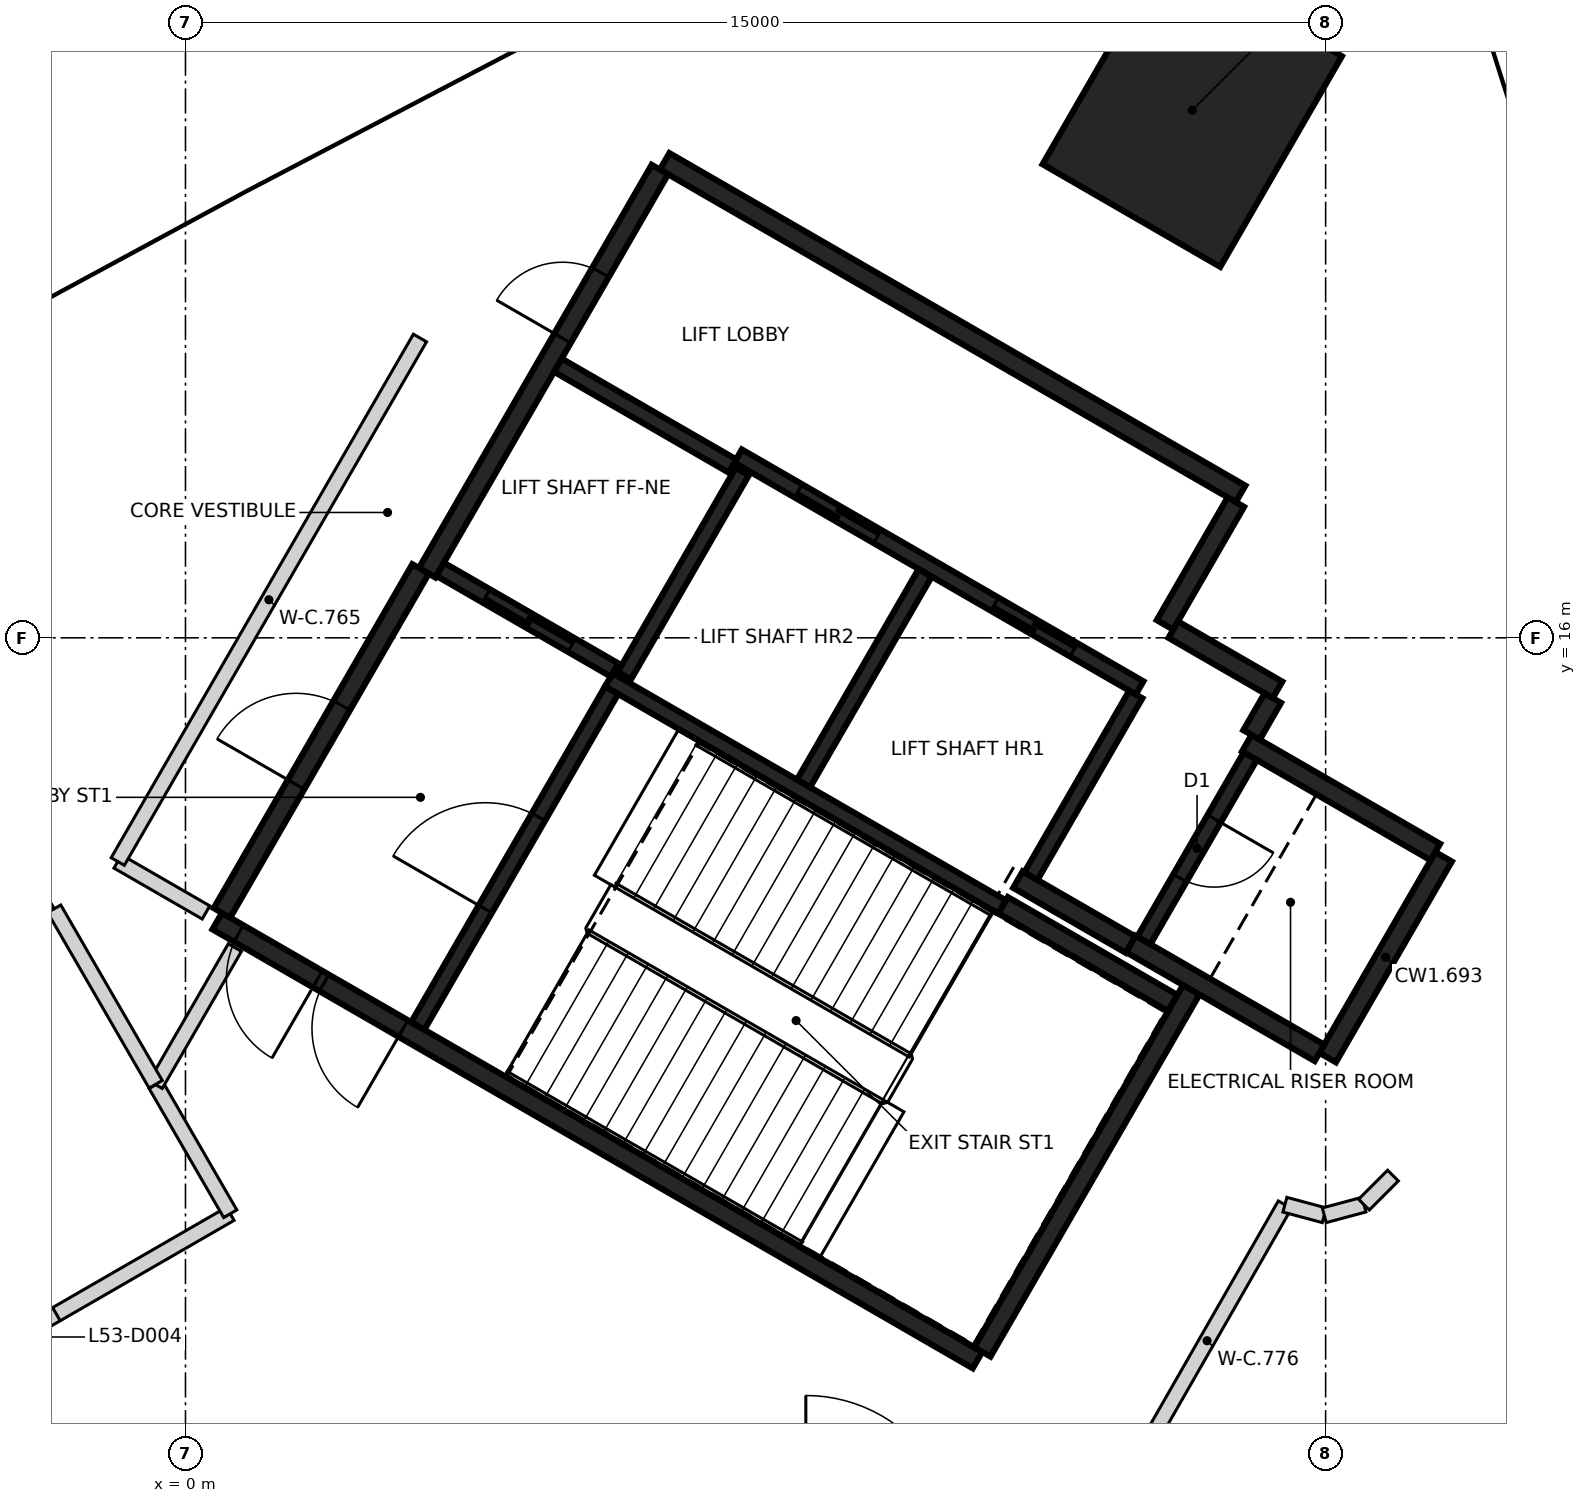
"""IFC4 building model, lengths in metres.
Left out: names, types, materials, properties, quantities, classifications, styles, units other than length and angle.
Written with IfcOpenShell. Run it as: python <this file> out.ifc"""

import sys

from ifc_helpers import new_model, si_unit, direction, frame, frame_2d, origin, origin_2d, place, context, subcontext, project, spatial, rectangle, extrude, element, fill, save


model = new_model("IFC4")
c1 = context("Model", 3, precision=1e-05, world=origin(), true_north=direction((0.0, 1.0)))
c2 = subcontext(c1, "Body", "Model", "MODEL_VIEW")
j1 = project(units=[si_unit("LENGTHUNIT", "METRE"), si_unit("PLANEANGLEUNIT", "RADIAN")], contexts=[c1])
p1 = place(None, origin())
s1 = spatial("IfcSite", under=j1, at=p1, CompositionType="ELEMENT")
p2 = place(p1, origin())
s2 = spatial("IfcBuilding", under=s1, at=p2, CompositionType="ELEMENT")
p3 = place(p2, frame((0.0, 0.0, 211.6)))
s3 = spatial("IfcBuildingStorey", under=s2, at=p3, CompositionType="ELEMENT", Elevation=211.6)
p4 = place(p3, frame((13.245, 22.941, -0.4), z_axis=(0.0, 0.0, 1.0), x_axis=(0.5, 0.866025403784, 0.0)))
e1 = element("IfcColumn", 1, at=p4, inside=s3, PredefinedType="COLUMN", context=c2, shape_type="SweptSolid", body=[
    extrude(rectangle(XDim=3.2, YDim=2.7, at=origin_2d()), origin(), (0.0, 0.0, 1.0), 4.85),
])
p5 = place(p3, frame((10.42, 6.498, 0.0), z_axis=(0.0, 0.0, 1.0), x_axis=(-0.866021906294, 0.500006057782, 0.0)))
e2 = element("IfcWall", 2, at=p5, inside=s3, PredefinedType="SHEAR", context=c2, shape_type="SweptSolid", body=[
    extrude(rectangle(XDim=11.55, YDim=0.25, at=frame_2d((5.775, 0.0))), origin(), (0.0, 0.0, 1.0), 4.45),
])
p6 = place(p5, frame((10.025, 0.0, 0.0)))
e3 = element("IfcOpeningElement", 3, at=p6, cuts=e2, PredefinedType="OPENING", context=c2, shape_type="SweptSolid", body=[
    extrude(rectangle(XDim=1.2, YDim=2.1, at=frame_2d((0.6, 1.05))), frame((0.0, 0.135, 0.0), z_axis=(0.0, -1.0, 0.0), x_axis=(1.0, 0.0, 0.0)), (0.0, 0.0, 1.0), 0.27),
])
p7 = place(p5, frame((8.725, 0.0, 0.0)))
e4 = element("IfcOpeningElement", 4, at=p7, cuts=e2, PredefinedType="OPENING", context=c2, shape_type="SweptSolid", body=[
    extrude(rectangle(XDim=1.2, YDim=2.1, at=frame_2d((0.6, 1.05))), frame((0.0, 0.135, 0.0), z_axis=(0.0, -1.0, 0.0), x_axis=(1.0, 0.0, 0.0)), (0.0, 0.0, 1.0), 0.27),
])
p8 = place(p3, frame((6.304, 22.269, 0.0), z_axis=(0.0, 0.0, 1.0), x_axis=(0.866022959057, -0.500004234368, 0.0)))
e5 = element("IfcWall", 5, at=p8, inside=s3, PredefinedType="SHEAR", context=c2, shape_type="SweptSolid", body=[
    extrude(rectangle(XDim=8.75, YDim=0.25, at=frame_2d((4.375, 0.0))), origin(), (0.0, 0.0, 1.0), 4.45),
])
p9 = place(p3, frame((3.179, 16.856, 0.0), z_axis=(0.0, 0.0, 1.0), x_axis=(0.500001955336, 0.866024274868, 0.0)))
e6 = element("IfcWall", 6, at=p9, inside=s3, PredefinedType="SHEAR", context=c2, shape_type="SweptSolid", body=[
    extrude(rectangle(XDim=6.125, YDim=0.25, at=frame_2d((3.062, 0.0))), origin(), (0.0, 0.0, 1.0), 4.45),
])
p10 = place(p9, frame((3.563, 0.0, 0.0)))
e7 = element("IfcOpeningElement", 7, at=p10, cuts=e6, PredefinedType="OPENING", context=c2, shape_type="SweptSolid", body=[
    extrude(rectangle(XDim=1.0, YDim=2.1, at=frame_2d((0.5, 1.05))), frame((0.0, 0.135, 0.0), z_axis=(0.0, -1.0, 0.0), x_axis=(1.0, 0.0, 0.0)), (0.0, 0.0, 1.0), 0.27),
])
p11 = place(p3, frame((0.48, 12.381, 0.0), z_axis=(0.0, 0.0, 1.0), x_axis=(0.49999885962, 0.866026062182, 0.0)))
e8 = element("IfcWall", 8, at=p11, inside=s3, PredefinedType="SHEAR", context=c2, shape_type="SweptSolid", body=[
    extrude(rectangle(XDim=5.225, YDim=0.25, at=frame_2d((2.612, 0.0))), origin(), (0.0, 0.0, 1.0), 4.45),
])
p12 = place(p11, frame((1.95, 0.0, 0.0)))
e9 = element("IfcOpeningElement", 9, at=p12, cuts=e8, PredefinedType="OPENING", context=c2, shape_type="SweptSolid", body=[
    extrude(rectangle(XDim=1.2, YDim=2.1, at=frame_2d((0.6, 1.05))), frame((0.0, 0.135, 0.0), z_axis=(0.0, -1.0, 0.0), x_axis=(1.0, 0.0, 0.0)), (0.0, 0.0, 1.0), 0.27),
])
p13 = place(p3, frame((13.238, 11.378, 0.0), z_axis=(0.0, 0.0, 1.0), x_axis=(-0.500008851346, -0.866020293397, 0.0)))
e10 = element("IfcWall", 10, at=p13, inside=s3, PredefinedType="SHEAR", context=c2, shape_type="SweptSolid", body=[
    extrude(rectangle(XDim=5.51, YDim=0.25, at=frame_2d((2.755, 0.0))), origin(), (0.0, 0.0, 1.0), 4.45),
])
p14 = place(p3, frame((16.552, 13.119, 0.0), z_axis=(0.0, 0.0, 1.0), x_axis=(-0.499978833458, -0.866037623948, 0.0)))
e11 = element("IfcWall", 11, at=p14, inside=s3, PredefinedType="SHEAR", context=c2, shape_type="SweptSolid", body=[
    extrude(rectangle(XDim=3.05, YDim=0.25, at=frame_2d((1.525, 0.0))), origin(), (0.0, 0.0, 1.0), 4.45),
])
p15 = place(p3, frame((14.918, 10.54, 0.0), z_axis=(0.0, 0.0, 1.0), x_axis=(-0.866063538972, 0.499933942099, 0.0)))
e12 = element("IfcWall", 12, at=p15, inside=s3, PredefinedType="SHEAR", context=c2, shape_type="SweptSolid", body=[
    extrude(rectangle(XDim=2.865, YDim=0.25, at=frame_2d((1.432, 0.0))), origin(), (0.0, 0.0, 1.0), 4.45),
])
p16 = place(p3, frame((13.963, 14.614, 0.0), z_axis=(0.0, 0.0, 1.0), x_axis=(0.866042235819, -0.499970844928, 0.0)))
e13 = element("IfcWall", 13, at=p16, inside=s3, PredefinedType="SHEAR", context=c2, shape_type="SweptSolid", body=[
    extrude(rectangle(XDim=2.865, YDim=0.25, at=frame_2d((1.432, 0.0))), origin(), (0.0, 0.0, 1.0), 4.45),
])
p17 = place(p3, frame((10.757, 12.481, 0.0), z_axis=(0.0, 0.0, 1.0), x_axis=(0.866022940537, -0.500004266446, 0.0)))
e14 = element("IfcWall", 14, at=p17, inside=s3, PredefinedType="SHEAR", context=c2, shape_type="SweptSolid", body=[
    extrude(rectangle(XDim=2.575, YDim=0.25, at=frame_2d((1.287, 0.0))), origin(), (0.0, 0.0, 1.0), 4.45),
])
p18 = place(p3, frame((13.819, 17.785, 0.0), z_axis=(0.0, 0.0, 1.0), x_axis=(-0.500039802285, -0.866002422705, 0.0)))
e15 = element("IfcWall", 15, at=p18, inside=s3, PredefinedType="SHEAR", context=c2, shape_type="SweptSolid", body=[
    extrude(rectangle(XDim=1.865, YDim=0.25, at=frame_2d((0.932, 0.0))), origin(), (0.0, 0.0, 1.0), 4.45),
])
p19 = place(p3, frame((12.433, 11.964, 0.0), z_axis=(0.0, 0.0, 1.0), x_axis=(-0.866038183914, 0.499977863513, 0.0)))
e16 = element("IfcWall", 16, at=p19, inside=s3, PredefinedType="SHEAR", context=c2, shape_type="SweptSolid", body=[
    extrude(rectangle(XDim=1.71, YDim=0.25, at=frame_2d((0.855, 0.0))), origin(), (0.0, 0.0, 1.0), 4.45),
])
p20 = place(p3, frame((12.995, 16.108, 0.0), z_axis=(0.0, 0.0, 1.0), x_axis=(0.866044474677, -0.49996696679, 0.0)))
e17 = element("IfcWall", 17, at=p20, inside=s3, PredefinedType="SHEAR", context=c2, shape_type="SweptSolid", body=[
    extrude(rectangle(XDim=1.584, YDim=0.25, at=frame_2d((0.792, 0.0))), origin(), (0.0, 0.0, 1.0), 4.45),
])
p21 = place(p3, frame((14.305, 15.207, 0.0), z_axis=(0.0, 0.0, 1.0), x_axis=(-0.499848422343, -0.866112899501, 0.0)))
e18 = element("IfcWall", 18, at=p21, inside=s3, PredefinedType="SHEAR", context=c2, shape_type="SweptSolid", body=[
    extrude(rectangle(XDim=0.559, YDim=0.25, at=frame_2d((0.28, 0.0))), origin(), (0.0, 0.0, 1.0), 4.45),
])
p22 = place(p3, frame((12.552, 15.342, 0.0), z_axis=(0.0, 0.0, 1.0), x_axis=(-0.866030299012, 0.499991521122, 0.0)))
e19 = element("IfcWall", 19, at=p22, inside=s3, PredefinedType="SHEAR", context=c2, shape_type="SweptSolid", body=[
    extrude(rectangle(XDim=6.1, YDim=0.2, at=frame_2d((3.05, 0.0))), origin(), (0.0, 0.0, 1.0), 4.45),
])
p23 = place(p22, frame((1.0, 0.0, 0.0)))
e20 = element("IfcOpeningElement", 20, at=p23, cuts=e19, PredefinedType="OPENING", context=c2, shape_type="SweptSolid", body=[
    extrude(rectangle(XDim=1.2, YDim=2.1, at=frame_2d((0.6, 1.05))), frame((0.0, 0.11, 0.0), z_axis=(0.0, -1.0, 0.0), x_axis=(1.0, 0.0, 0.0)), (0.0, 0.0, 1.0), 0.22),
])
p24 = place(p22, frame((3.982, 0.0, 0.0)))
e21 = element("IfcOpeningElement", 21, at=p24, cuts=e19, PredefinedType="OPENING", context=c2, shape_type="SweptSolid", body=[
    extrude(rectangle(XDim=1.2, YDim=2.1, at=frame_2d((0.6, 1.05))), frame((0.0, 0.11, 0.0), z_axis=(0.0, -1.0, 0.0), x_axis=(1.0, 0.0, 0.0)), (0.0, 0.0, 1.0), 0.22),
])
p25 = place(p3, frame((10.743, 12.46, 0.0), z_axis=(0.0, 0.0, 1.0), x_axis=(-0.866018848283, 0.500011354289, 0.0)))
e22 = element("IfcWall", 22, at=p25, inside=s3, PredefinedType="SHEAR", context=c2, shape_type="SweptSolid", body=[
    extrude(rectangle(XDim=5.974, YDim=0.2, at=frame_2d((2.987, 0.0))), origin(), (0.0, 0.0, 1.0), 4.45),
])
p26 = place(p3, frame((3.057, 10.895, 0.0), z_axis=(0.0, 0.0, 1.0), x_axis=(0.500027839223, 0.866009330205, 0.0)))
e23 = element("IfcWall", 23, at=p26, inside=s3, PredefinedType="SHEAR", context=c2, shape_type="SweptSolid", body=[
    extrude(rectangle(XDim=5.098, YDim=0.2, at=frame_2d((2.549, 0.0))), origin(), (0.0, 0.0, 1.0), 4.45),
])
p27 = place(p26, frame((1.774, 0.0, 0.0)))
e24 = element("IfcOpeningElement", 24, at=p27, cuts=e23, PredefinedType="OPENING", context=c2, shape_type="SweptSolid", body=[
    extrude(rectangle(XDim=1.4, YDim=2.1, at=frame_2d((0.7, 1.05))), frame((0.0, 0.11, 0.0), z_axis=(0.0, -1.0, 0.0), x_axis=(1.0, 0.0, 0.0)), (0.0, 0.0, 1.0), 0.22),
])
p28 = place(p3, frame((8.132, 14.084, 0.0), z_axis=(0.0, 0.0, 1.0), x_axis=(0.500030834389, 0.86600760081, 0.0)))
e25 = element("IfcWall", 25, at=p28, inside=s3, PredefinedType="SHEAR", context=c2, shape_type="SweptSolid", body=[
    extrude(rectangle(XDim=3.198, YDim=0.2, at=frame_2d((1.599, 0.0))), origin(), (0.0, 0.0, 1.0), 4.45),
])
p29 = place(p3, frame((14.008, 14.442, 0.0), z_axis=(0.0, 0.0, 1.0), x_axis=(-0.499986818241, -0.866033014143, 0.0)))
e26 = element("IfcWall", 26, at=p29, inside=s3, PredefinedType="SHEAR", context=c2, shape_type="SweptSolid", body=[
    extrude(rectangle(XDim=2.798, YDim=0.2, at=frame_2d((1.399, 0.0))), origin(), (0.0, 0.0, 1.0), 4.45),
])
p30 = place(p29, frame((0.949, 0.0, 0.0)))
e27 = element("IfcOpeningElement", 27, at=p30, cuts=e26, PredefinedType="OPENING", context=c2, shape_type="SweptSolid", body=[
    extrude(rectangle(XDim=0.9, YDim=2.1, at=frame_2d((0.45, 1.05))), frame((0.0, 0.11, 0.0), z_axis=(0.0, -1.0, 0.0), x_axis=(1.0, 0.0, 0.0)), (0.0, 0.0, 1.0), 0.22),
])
p31 = place(p3, frame((12.502, 15.255, 0.0), z_axis=(0.0, 0.0, 1.0), x_axis=(-0.499965018551, -0.866045599391, 0.0)))
e28 = element("IfcWall", 28, at=p31, inside=s3, PredefinedType="SHEAR", context=c2, shape_type="SweptSolid", body=[
    extrude(rectangle(XDim=2.759, YDim=0.2, at=frame_2d((1.379, 0.0))), origin(), (0.0, 0.0, 1.0), 4.45),
])
p32 = place(p3, frame((7.324, 18.187, 0.0), z_axis=(0.0, 0.0, 1.0), x_axis=(-0.499967891604, -0.866043940782, 0.0)))
e29 = element("IfcWall", 29, at=p32, inside=s3, PredefinedType="SHEAR", context=c2, shape_type="SweptSolid", body=[
    extrude(rectangle(XDim=3.1, YDim=0.2, at=frame_2d((1.55, 0.0))), origin(), (0.0, 0.0, 1.0), 4.45),
])
p33 = place(p3, frame((5.646, 15.576, 0.0), z_axis=(0.0, 0.0, 1.0), x_axis=(-0.866018407898, 0.500012117035, 0.0)))
e30 = element("IfcWall", 30, at=p33, inside=s3, PredefinedType="SHEAR", context=c2, shape_type="SweptSolid", body=[
    extrude(rectangle(XDim=2.651, YDim=0.2, at=frame_2d((1.325, 0.0))), origin(), (0.0, 0.0, 1.0), 4.45),
])
p34 = place(p33, frame((0.652, 0.0, 0.0)))
e31 = element("IfcOpeningElement", 31, at=p34, cuts=e30, PredefinedType="OPENING", context=c2, shape_type="SweptSolid", body=[
    extrude(rectangle(XDim=1.3, YDim=2.1, at=frame_2d((0.65, 1.05))), frame((0.0, 0.11, 0.0), z_axis=(0.0, -1.0, 0.0), x_axis=(1.0, 0.0, 0.0)), (0.0, 0.0, 1.0), 0.22),
])
p35 = place(p3, frame((7.196, 18.26, 0.0), z_axis=(0.0, 0.0, 1.0), x_axis=(-0.866018407898, 0.500012117035, 0.0)))
e32 = element("IfcWall", 32, at=p35, inside=s3, PredefinedType="SHEAR", context=c2, shape_type="SweptSolid", body=[
    extrude(rectangle(XDim=2.651, YDim=0.2, at=frame_2d((1.325, 0.0))), origin(), (0.0, 0.0, 1.0), 4.45),
])
p36 = place(p3, frame((-6.992, 4.046, 0.0), z_axis=(0.0, 0.0, 1.0), x_axis=(0.866074131153, 0.499915592224, 0.0)))
e33 = element("IfcWall", 33, at=p36, inside=s3, PredefinedType="PARTITIONING", context=c2, shape_type="SweptSolid", body=[
    extrude(rectangle(XDim=8.754, YDim=0.2, at=frame_2d((4.377, 0.0))), origin(), (0.0, 0.0, 1.0), 4.45),
])
p37 = place(p36, frame((4.913, 0.0, 0.0)))
e34 = element("IfcOpeningElement", 34, at=p37, cuts=e33, PredefinedType="OPENING", context=c2, shape_type="SweptSolid", body=[
    extrude(rectangle(XDim=1.2, YDim=2.1, at=frame_2d((0.6, 1.05))), frame((0.0, 0.11, 0.0), z_axis=(0.0, -1.0, 0.0), x_axis=(1.0, 0.0, 0.0)), (0.0, 0.0, 1.0), 0.22),
])
p38 = place(p3, frame((-0.891, 13.057, 0.0), z_axis=(0.0, 0.0, 1.0), x_axis=(0.866206814563, -0.499685655593, 0.0)))
e35 = element("IfcWall", 35, at=p38, inside=s3, PredefinedType="PARTITIONING", context=c2, shape_type="SweptSolid", body=[
    extrude(rectangle(XDim=1.34, YDim=0.2, at=frame_2d((0.67, 0.0))), origin(), (0.0, 0.0, 1.0), 4.45),
])
p39 = place(p3, frame((-0.891, 13.057, 0.0), z_axis=(0.0, 0.0, 1.0), x_axis=(0.499972238474, 0.866041431316, 0.0)))
e36 = element("IfcWall", 36, at=p39, inside=s3, PredefinedType="PARTITIONING", context=c2, shape_type="SweptSolid", body=[
    extrude(rectangle(XDim=7.953, YDim=0.2, at=frame_2d((3.977, 0.0))), origin(), (0.0, 0.0, 1.0), 4.45),
])
p40 = place(p3, frame((-0.392, 10.121, 0.0), z_axis=(0.0, 0.0, 1.0), x_axis=(0.500329449036, -0.865835112725, 0.0)))
e37 = element("IfcWall", 37, at=p40, inside=s3, PredefinedType="PARTITIONING", context=c2, shape_type="SweptSolid", body=[
    extrude(rectangle(XDim=1.961, YDim=0.2, at=frame_2d((0.98, 0.0))), origin(), (0.0, 0.0, 1.0), 4.45),
])
p41 = place(p3, frame((-0.392, 10.121, 0.0), z_axis=(0.0, 0.0, 1.0), x_axis=(0.50017216111, 0.865925983702, 0.0)))
e38 = element("IfcWall", 38, at=p41, inside=s3, PredefinedType="PARTITIONING", context=c2, shape_type="SweptSolid", body=[
    extrude(rectangle(XDim=2.083, YDim=0.2, at=frame_2d((1.042, 0.0))), origin(), (0.0, 0.0, 1.0), 4.45),
])
p42 = place(p3, frame((12.416, 4.963, 0.0), z_axis=(0.0, 0.0, 1.0), x_axis=(0.496668044938, 0.867940581571, 0.0)))
e39 = element("IfcWall", 39, at=p42, inside=s3, PredefinedType="PARTITIONING", context=c2, shape_type="SweptSolid", body=[
    extrude(rectangle(XDim=4.124, YDim=0.2, at=frame_2d((2.062, 0.0))), origin(), (0.0, 0.0, 1.0), 4.45),
])
p43 = place(p3, frame((14.464, 8.542, 0.0), z_axis=(0.0, 0.0, 1.0), x_axis=(0.965848396518, -0.259107844233, 0.0)))
e40 = element("IfcWall", 40, at=p43, inside=s3, PredefinedType="PARTITIONING", context=c2, shape_type="SweptSolid", body=[
    extrude(rectangle(XDim=0.536, YDim=0.2, at=frame_2d((0.268, 0.0))), origin(), (0.0, 0.0, 1.0), 4.45),
])
for number, where, z_axis, x_axis in (
    (41, (14.982, 8.403, 0.0), (0.0, 0.0, 1.0), (0.966, 0.259, 0.0)),
    (42, (15.504, 8.543, 0.0), (0.0, 0.0, 1.0), (0.707, 0.707, 0.0)),
):
    element("IfcWall", number, at=place(p3, frame(where, z_axis=z_axis, x_axis=x_axis)), inside=s3, PredefinedType="PARTITIONING", context=c2, shape_type="SweptSolid", body=[
        extrude(rectangle(XDim=0.54, YDim=0.2, at=frame_2d((0.27, 0.0))), origin(), (0.0, 0.0, 1.0), 4.45),
    ])
p44 = place(p3, frame((-7.342, 9.193, 0.0), z_axis=(0.0, 0.0, 1.0), x_axis=(0.866016906217, 0.500014717929, 0.0)))
e43 = element("IfcWall", 43, at=p44, inside=s3, PredefinedType="PARTITIONING", context=c2, shape_type="SweptSolid", body=[
    extrude(rectangle(XDim=6.484, YDim=0.2, at=frame_2d((3.242, 0.0))), origin(), (0.0, 0.0, 1.0), 4.45),
])
p45 = place(p3, frame((-1.727, 12.435, 0.0), z_axis=(0.0, 0.0, 1.0), x_axis=(0.500509380909, -0.865731112772, 0.0)))
e44 = element("IfcWall", 44, at=p45, inside=s3, PredefinedType="PARTITIONING", context=c2, shape_type="SweptSolid", body=[
    extrude(rectangle(XDim=2.667, YDim=0.2, at=frame_2d((1.333, 0.0))), origin(), (0.0, 0.0, 1.0), 4.45),
])
p46 = place(p34, origin())
e45 = element("IfcDoor", 45, at=p46, inside=s3, OperationType="SLIDING_TO_LEFT", PredefinedType="DOOR", context=c2, shape_type="SweptSolid", body=[
    extrude(rectangle(XDim=1.3, YDim=2.1, at=frame_2d((0.65, 1.05))), frame((0.0, 0.025, 0.0), z_axis=(0.0, -1.0, 0.0), x_axis=(1.0, 0.0, 0.0)), (0.0, 0.0, 1.0), 0.05),
])
fill(e31, e45)
p47 = place(p23, origin())
e46 = element("IfcDoor", 46, at=p47, inside=s3, OperationType="DOUBLE_DOOR_SLIDING", PredefinedType="DOOR", context=c2, shape_type="SweptSolid", body=[
    extrude(rectangle(XDim=1.2, YDim=2.1, at=frame_2d((0.6, 1.05))), frame((0.0, 0.025, 0.0), z_axis=(0.0, -1.0, 0.0), x_axis=(1.0, 0.0, 0.0)), (0.0, 0.0, 1.0), 0.05),
])
fill(e20, e46)
p48 = place(p24, origin())
e47 = element("IfcDoor", 47, at=p48, inside=s3, OperationType="DOUBLE_DOOR_SLIDING", PredefinedType="DOOR", context=c2, shape_type="SweptSolid", body=[
    extrude(rectangle(XDim=1.2, YDim=2.1, at=frame_2d((0.6, 1.05))), frame((0.0, 0.025, 0.0), z_axis=(0.0, -1.0, 0.0), x_axis=(1.0, 0.0, 0.0)), (0.0, 0.0, 1.0), 0.05),
])
fill(e21, e47)
p49 = place(p10, origin())
e48 = element("IfcDoor", 48, at=p49, inside=s3, OperationType="SINGLE_SWING_LEFT", PredefinedType="DOOR", context=c2, shape_type="SweptSolid", body=[
    extrude(rectangle(XDim=1.0, YDim=2.1, at=frame_2d((0.5, 1.05))), frame((0.0, 0.025, 0.0), z_axis=(0.0, -1.0, 0.0), x_axis=(1.0, 0.0, 0.0)), (0.0, 0.0, 1.0), 0.05),
])
fill(e7, e48)
p50 = place(p6, origin())
e49 = element("IfcDoor", 49, at=p50, inside=s3, OperationType="SINGLE_SWING_LEFT", PredefinedType="DOOR", context=c2, shape_type="SweptSolid", body=[
    extrude(rectangle(XDim=1.2, YDim=2.1, at=frame_2d((0.6, 1.05))), frame((0.0, 0.025, 0.0), z_axis=(0.0, -1.0, 0.0), x_axis=(1.0, 0.0, 0.0)), (0.0, 0.0, 1.0), 0.05),
])
fill(e3, e49)
p51 = place(p7, origin())
e50 = element("IfcDoor", 50, at=p51, inside=s3, OperationType="SINGLE_SWING_RIGHT", PredefinedType="DOOR", context=c2, shape_type="SweptSolid", body=[
    extrude(rectangle(XDim=1.2, YDim=2.1, at=frame_2d((0.6, 1.05))), frame((0.0, 0.025, 0.0), z_axis=(0.0, -1.0, 0.0), x_axis=(1.0, 0.0, 0.0)), (0.0, 0.0, 1.0), 0.05),
])
fill(e4, e50)
p52 = place(p27, origin())
e51 = element("IfcDoor", 51, at=p52, inside=s3, OperationType="SINGLE_SWING_LEFT", PredefinedType="DOOR", context=c2, shape_type="SweptSolid", body=[
    extrude(rectangle(XDim=1.4, YDim=2.1, at=frame_2d((0.7, 1.05))), frame((0.0, 0.025, 0.0), z_axis=(0.0, -1.0, 0.0), x_axis=(1.0, 0.0, 0.0)), (0.0, 0.0, 1.0), 0.05),
])
fill(e24, e51)
p53 = place(p30, origin())
e52 = element("IfcDoor", 52, at=p53, inside=s3, OperationType="SINGLE_SWING_RIGHT", PredefinedType="DOOR", context=c2, shape_type="SweptSolid", body=[
    extrude(rectangle(XDim=0.9, YDim=2.1, at=frame_2d((0.45, 1.05))), frame((0.0, 0.025, 0.0), z_axis=(0.0, -1.0, 0.0), x_axis=(1.0, 0.0, 0.0)), (0.0, 0.0, 1.0), 0.05),
])
fill(e27, e52)
p54 = place(p12, origin())
e53 = element("IfcDoor", 53, at=p54, inside=s3, OperationType="SINGLE_SWING_RIGHT", PredefinedType="DOOR", context=c2, shape_type="SweptSolid", body=[
    extrude(rectangle(XDim=1.2, YDim=2.1, at=frame_2d((0.6, 1.05))), frame((0.0, 0.025, 0.0), z_axis=(0.0, -1.0, 0.0), x_axis=(1.0, 0.0, 0.0)), (0.0, 0.0, 1.0), 0.05),
])
fill(e9, e53)
p55 = place(p37, origin())
e54 = element("IfcDoor", 54, at=p55, inside=s3, OperationType="SINGLE_SWING_LEFT", PredefinedType="DOOR", context=c2, shape_type="SweptSolid", body=[
    extrude(rectangle(XDim=1.2, YDim=2.1, at=frame_2d((0.6, 1.05))), frame((0.0, 0.025, 0.0), z_axis=(0.0, -1.0, 0.0), x_axis=(1.0, 0.0, 0.0)), (0.0, 0.0, 1.0), 0.05),
])
fill(e34, e54)
save(model, sys.argv[1])
